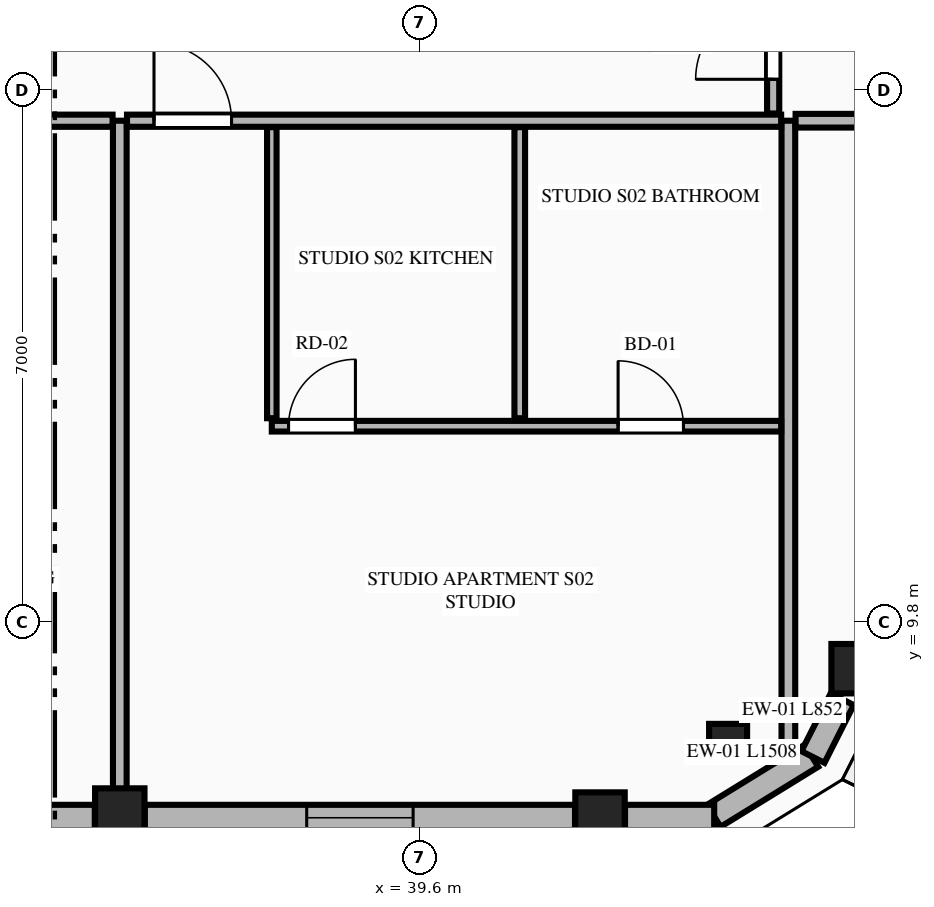
"""IFC4 building model, lengths in metres.
Left out: names, types, materials, properties, quantities, classifications, styles, units other than length and angle.
Written with IfcOpenShell. Run it as: python <this file> out.ifc"""

import sys

from ifc_helpers import new_model, si_unit, direction, frame, frame_2d, origin, origin_2d, place, context, subcontext, project, spatial, rectangle, extrude, element, fill, save


model = new_model("IFC4")
c1 = context("Model", 3, precision=1e-05, world=origin(), true_north=direction((0.0, 1.0)))
c2 = subcontext(c1, "Body", "Model", "MODEL_VIEW")
j1 = project(units=[si_unit("LENGTHUNIT", "METRE"), si_unit("PLANEANGLEUNIT", "RADIAN")], contexts=[c1])
p1 = place(None, origin())
s1 = spatial("IfcSite", under=j1, at=p1, CompositionType="ELEMENT")
p2 = place(p1, origin())
s2 = spatial("IfcBuilding", under=s1, at=p2, CompositionType="ELEMENT")
p3 = place(p2, frame((0.0, 0.0, 259.85)))
s3 = spatial("IfcBuildingStorey", under=s2, at=p3, CompositionType="ELEMENT", Elevation=259.85)
for number, where, z_axis, x_axis in (
    (1, (35.654, 7.292, 0.0), (0.0, 0.0, 1.0), (1.0, 0.0, 0.0)),
    (2, (41.972, 7.239, 0.0), (0.0, 0.0, 1.0), (1.0, 0.0, 0.0)),
    (3, (45.341, 9.191, 0.0), (0.0, 0.0, 1.0), (1.0, 0.0, 0.0)),
):
    element("IfcColumn", number, at=place(p3, frame(where, z_axis=z_axis, x_axis=x_axis)), inside=s3, PredefinedType="COLUMN", context=c2, shape_type="SweptSolid", body=[
        extrude(rectangle(XDim=0.65, YDim=0.65, at=origin_2d()), origin(), (0.0, 0.0, 1.0), 3.65),
    ])
p4 = place(p3, frame((43.657, 8.215, 0.0), z_axis=(0.0, 0.0, 1.0), x_axis=(0.865256437757, 0.501329529272, 0.0)))
e4 = element("IfcColumn", 4, at=p4, inside=s3, PredefinedType="PILASTER", context=c2, shape_type="SweptSolid", body=[
    extrude(rectangle(XDim=0.5, YDim=0.35, at=origin_2d()), origin(), (0.0, 0.0, 1.0), 3.65),
])
p5 = place(p3, frame((43.469, 7.255, 0.0), z_axis=(0.0, 0.0, 1.0), x_axis=(0.851680557619, 0.52406128246, 0.0)))
e5 = element("IfcWall", 5, at=p5, inside=s3, PredefinedType="STANDARD", context=c2, shape_type="SweptSolid", body=[
    extrude(rectangle(XDim=1.508, YDim=0.34, at=frame_2d((0.754, 0.0))), origin(), (0.0, 0.0, 1.0), 3.45),
])
p6 = place(p3, frame((29.475, 7.23, 0.0), z_axis=(0.0, 0.0, 1.0), x_axis=(1.0, 0.0, 0.0)))
e6 = element("IfcWall", 6, at=p6, inside=s3, PredefinedType="STANDARD", context=c2, shape_type="SweptSolid", body=[
    extrude(rectangle(XDim=5.85, YDim=0.34, at=frame_2d((2.925, 0.0))), origin(), (0.0, 0.0, 1.0), 2.983),
])
p7 = place(p6, frame((2.15, 0.0, 0.75)))
e7 = element("IfcOpeningElement", 7, at=p7, cuts=e6, PredefinedType="OPENING", context=c2, shape_type="SweptSolid", body=[
    extrude(rectangle(XDim=1.55, YDim=2.05, at=frame_2d((0.775, 1.025))), frame((0.0, 0.18, 0.0), z_axis=(0.0, -1.0, 0.0), x_axis=(1.0, 0.0, 0.0)), (0.0, 0.0, 1.0), 0.36),
])
p8 = place(p3, frame((35.983, 7.23, 0.0), z_axis=(0.0, 0.0, 1.0), x_axis=(1.0, 0.0, 0.0)))
e8 = element("IfcWall", 8, at=p8, inside=s3, PredefinedType="STANDARD", context=c2, shape_type="SweptSolid", body=[
    extrude(rectangle(XDim=5.66, YDim=0.34, at=frame_2d((2.83, 0.0))), origin(), (0.0, 0.0, 1.0), 2.983),
])
p9 = place(p8, frame((2.13, 0.0, 0.75)))
e9 = element("IfcOpeningElement", 9, at=p9, cuts=e8, PredefinedType="OPENING", context=c2, shape_type="SweptSolid", body=[
    extrude(rectangle(XDim=1.4, YDim=2.05, at=frame_2d((0.7, 1.025))), frame((0.0, 0.18, 0.0), z_axis=(0.0, -1.0, 0.0), x_axis=(1.0, 0.0, 0.0)), (0.0, 0.0, 1.0), 0.36),
])
p10 = place(p3, frame((42.301, 7.23, 0.0), z_axis=(0.0, 0.0, 1.0), x_axis=(1.0, 0.0, 0.0)))
e10 = element("IfcWall", 10, at=p10, inside=s3, PredefinedType="STANDARD", context=c2, shape_type="SweptSolid", body=[
    extrude(rectangle(XDim=1.173, YDim=0.34, at=frame_2d((0.586, 0.0))), origin(), (0.0, 0.0, 1.0), 3.45),
])
p11 = place(p3, frame((44.773, 8.029, 0.0), z_axis=(0.0, 0.0, 1.0), x_axis=(0.451907025977, 0.8920650424, 0.0)))
e11 = element("IfcWall", 11, at=p11, inside=s3, PredefinedType="STANDARD", context=c2, shape_type="SweptSolid", body=[
    extrude(rectangle(XDim=0.852, YDim=0.34, at=frame_2d((0.426, 0.0))), origin(), (0.0, 0.0, 1.0), 3.45),
])
p12 = place(p3, frame((35.654, 7.405, 0.0), z_axis=(0.0, 0.0, 1.0), x_axis=(0.0, 1.0, 0.0)))
e12 = element("IfcWall", 12, at=p12, inside=s3, PredefinedType="PARTITIONING", context=c2, shape_type="SweptSolid", body=[
    extrude(rectangle(XDim=8.995, YDim=0.18, at=frame_2d((4.498, 0.0))), origin(), (0.0, 0.0, 1.0), 2.907),
])
p13 = place(p3, frame((44.45, 8.119, 0.0), z_axis=(0.0, 0.0, 1.0), x_axis=(0.0, 1.0, 0.0)))
e13 = element("IfcWall", 13, at=p13, inside=s3, PredefinedType="PARTITIONING", context=c2, shape_type="SweptSolid", body=[
    extrude(rectangle(XDim=8.281, YDim=0.18, at=frame_2d((4.141, 0.0))), origin(), (0.0, 0.0, 1.0), 3.45),
])
p14 = place(p3, frame((20.445, 16.4, 0.0), z_axis=(0.0, 0.0, 1.0), x_axis=(1.0, 0.0, 0.0)))
e14 = element("IfcWall", 14, at=p14, inside=s3, PredefinedType="PARTITIONING", context=c2, shape_type="SweptSolid", body=[
    extrude(rectangle(XDim=15.114, YDim=0.16, at=frame_2d((7.557, 0.0))), origin(), (0.0, 0.0, 1.0), 3.45),
])
p15 = place(p14, frame((13.259, 0.0, 0.0)))
e15 = element("IfcOpeningElement", 15, at=p15, cuts=e14, PredefinedType="OPENING", context=c2, shape_type="SweptSolid", body=[
    extrude(rectangle(XDim=1.02, YDim=2.25, at=frame_2d((0.51, 1.125))), frame((0.0, 0.09, 0.0), z_axis=(0.0, -1.0, 0.0), x_axis=(1.0, 0.0, 0.0)), (0.0, 0.0, 1.0), 0.18),
])
p16 = place(p3, frame((35.749, 16.4, 0.0), z_axis=(0.0, 0.0, 1.0), x_axis=(1.0, 0.0, 0.0)))
e16 = element("IfcWall", 16, at=p16, inside=s3, PredefinedType="PARTITIONING", context=c2, shape_type="SweptSolid", body=[
    extrude(rectangle(XDim=8.606, YDim=0.16, at=frame_2d((4.303, 0.0))), origin(), (0.0, 0.0, 1.0), 3.45),
])
p17 = place(p16, frame((0.355, 0.0, 0.0)))
e17 = element("IfcOpeningElement", 17, at=p17, cuts=e16, PredefinedType="OPENING", context=c2, shape_type="SweptSolid", body=[
    extrude(rectangle(XDim=1.02, YDim=2.25, at=frame_2d((0.51, 1.125))), frame((0.0, 0.09, 0.0), z_axis=(0.0, -1.0, 0.0), x_axis=(1.0, 0.0, 0.0)), (0.0, 0.0, 1.0), 0.18),
])
p18 = place(p3, frame((37.654, 12.486, 0.0), z_axis=(0.0, 0.0, 1.0), x_axis=(0.0, 1.0, 0.0)))
e18 = element("IfcWall", 18, at=p18, inside=s3, PredefinedType="PARTITIONING", context=c2, shape_type="SweptSolid", body=[
    extrude(rectangle(XDim=3.829, YDim=0.125, at=frame_2d((1.915, 0.0))), origin(), (0.0, 0.0, 1.0), 3.45),
])
p19 = place(p3, frame((37.654, 12.381, 0.0), z_axis=(0.0, 0.0, 1.0), x_axis=(1.0, 0.0, 0.0)))
e19 = element("IfcWall", 19, at=p19, inside=s3, PredefinedType="PLUMBINGWALL", context=c2, shape_type="SweptSolid", body=[
    extrude(rectangle(XDim=6.701, YDim=0.14, at=frame_2d((3.351, 0.0))), origin(), (0.0, 0.0, 1.0), 3.45),
])
p20 = place(p19, frame((4.556, 0.0, 0.0)))
e20 = element("IfcOpeningElement", 20, at=p20, cuts=e19, PredefinedType="OPENING", context=c2, shape_type="SweptSolid", body=[
    extrude(rectangle(XDim=0.86, YDim=2.1, at=frame_2d((0.43, 1.05))), frame((0.0, 0.08, 0.0), z_axis=(0.0, -1.0, 0.0), x_axis=(1.0, 0.0, 0.0)), (0.0, 0.0, 1.0), 0.16),
])
p21 = place(p19, frame((0.22, 0.0, 0.0)))
e21 = element("IfcOpeningElement", 21, at=p21, cuts=e19, PredefinedType="OPENING", context=c2, shape_type="SweptSolid", body=[
    extrude(rectangle(XDim=0.88, YDim=2.15, at=frame_2d((0.44, 1.075))), frame((0.0, 0.08, 0.0), z_axis=(0.0, -1.0, 0.0), x_axis=(1.0, 0.0, 0.0)), (0.0, 0.0, 1.0), 0.16),
])
p22 = place(p3, frame((40.916, 12.486, 0.0), z_axis=(0.0, 0.0, 1.0), x_axis=(0.0, 1.0, 0.0)))
e22 = element("IfcWall", 22, at=p22, inside=s3, PredefinedType="PLUMBINGWALL", context=c2, shape_type="SweptSolid", body=[
    extrude(rectangle(XDim=3.829, YDim=0.14, at=frame_2d((1.915, 0.0))), origin(), (0.0, 0.0, 1.0), 3.45),
])
p23 = place(p3, frame((44.545, 16.4, 0.0), z_axis=(0.0, 0.0, 1.0), x_axis=(1.0, 0.0, 0.0)))
e23 = element("IfcWall", 23, at=p23, inside=s3, PredefinedType="PARTITIONING", context=c2, shape_type="SweptSolid", body=[
    extrude(rectangle(XDim=4.221, YDim=0.18, at=frame_2d((2.111, 0.0))), origin(), (0.0, 0.0, 1.0), 3.45),
])
p24 = place(p3, frame((44.25, 16.495, 0.0), z_axis=(0.0, 0.0, 1.0), x_axis=(0.0, 1.0, 0.0)))
e24 = element("IfcWall", 24, at=p24, inside=s3, PredefinedType="PARTITIONING", context=c2, shape_type="SweptSolid", body=[
    extrude(rectangle(XDim=9.854, YDim=0.16, at=frame_2d((4.927, 0.0))), origin(), (0.0, 0.0, 1.0), 3.137),
])
p25 = place(p24, frame((0.45, 0.0, 0.0)))
e25 = element("IfcOpeningElement", 25, at=p25, cuts=e24, PredefinedType="OPENING", context=c2, shape_type="SweptSolid", body=[
    extrude(rectangle(XDim=1.02, YDim=2.25, at=frame_2d((0.51, 1.125))), frame((0.0, 0.09, 0.0), z_axis=(0.0, -1.0, 0.0), x_axis=(1.0, 0.0, 0.0)), (0.0, 0.0, 1.0), 0.18),
])
p26 = place(p9, origin())
e26 = element("IfcWindow", 26, at=p26, inside=s3, PartitioningType="SINGLE_PANEL", PredefinedType="WINDOW", context=c2, shape_type="SweptSolid", body=[
    extrude(rectangle(XDim=1.4, YDim=2.05, at=frame_2d((0.7, 1.025))), frame((0.0, 0.03, 0.0), z_axis=(0.0, -1.0, 0.0), x_axis=(1.0, 0.0, 0.0)), (0.0, 0.0, 1.0), 0.06),
])
fill(e9, e26)
p27 = place(p20, origin())
e27 = element("IfcDoor", 27, at=p27, inside=s3, OperationType="SINGLE_SWING_LEFT", PredefinedType="DOOR", context=c2, shape_type="SweptSolid", body=[
    extrude(rectangle(XDim=0.86, YDim=2.1, at=frame_2d((0.43, 1.05))), frame((0.0, 0.025, 0.0), z_axis=(0.0, -1.0, 0.0), x_axis=(1.0, 0.0, 0.0)), (0.0, 0.0, 1.0), 0.05),
])
fill(e20, e27)
p28 = place(p17, origin())
e28 = element("IfcDoor", 28, at=p28, inside=s3, OperationType="SINGLE_SWING_LEFT", PredefinedType="DOOR", context=c2, shape_type="SweptSolid", body=[
    extrude(rectangle(XDim=1.02, YDim=2.25, at=frame_2d((0.51, 1.125))), frame((0.0, 0.025, 0.0), z_axis=(0.0, -1.0, 0.0), x_axis=(1.0, 0.0, 0.0)), (0.0, 0.0, 1.0), 0.05),
])
fill(e17, e28)
p29 = place(p21, origin())
e29 = element("IfcDoor", 29, at=p29, inside=s3, OperationType="SINGLE_SWING_RIGHT", PredefinedType="DOOR", context=c2, shape_type="SweptSolid", body=[
    extrude(rectangle(XDim=0.88, YDim=2.15, at=frame_2d((0.44, 1.075))), frame((0.0, 0.025, 0.0), z_axis=(0.0, -1.0, 0.0), x_axis=(1.0, 0.0, 0.0)), (0.0, 0.0, 1.0), 0.05),
])
fill(e21, e29)
p30 = place(p25, origin())
e30 = element("IfcDoor", 30, at=p30, inside=s3, OperationType="SINGLE_SWING_LEFT", PredefinedType="DOOR", context=c2, shape_type="SweptSolid", body=[
    extrude(rectangle(XDim=1.02, YDim=2.25, at=frame_2d((0.51, 1.125))), frame((0.0, 0.025, 0.0), z_axis=(0.0, -1.0, 0.0), x_axis=(1.0, 0.0, 0.0)), (0.0, 0.0, 1.0), 0.05),
])
fill(e25, e30)
save(model, sys.argv[1])
